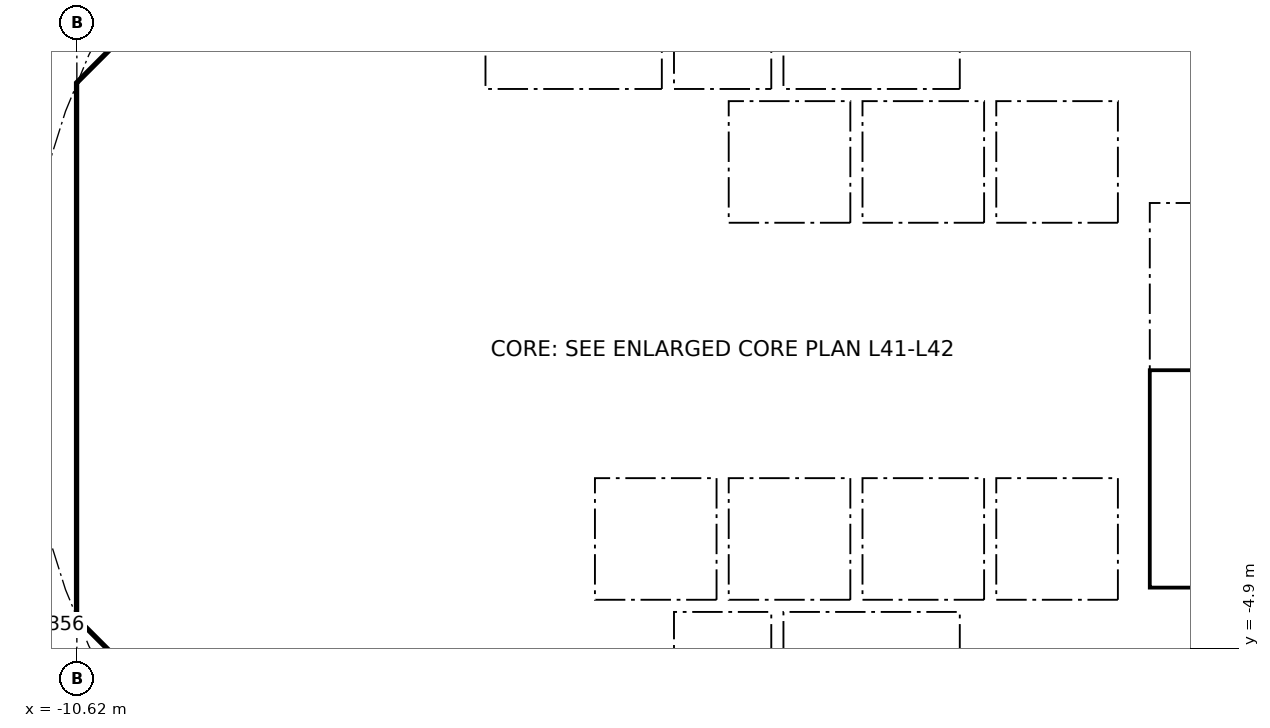
"""IFC4 building model, lengths in metres.
Left out: names, types, materials, properties, quantities, classifications, styles, units other than length and angle.
Written with IfcOpenShell. Run it as: python <this file> out.ifc"""

import sys

from ifc_helpers import new_model, si_unit, direction, frame, frame_2d, origin, place, context, subcontext, project, spatial, polyline, rectangle, outline, extrude, element, fill, save


model = new_model("IFC4")
c1 = context("Model", 3, precision=1e-05, world=origin(), true_north=direction((0.0, 1.0)))
c2 = subcontext(c1, "Body", "Model", "MODEL_VIEW")
j1 = project(units=[si_unit("LENGTHUNIT", "METRE"), si_unit("PLANEANGLEUNIT", "RADIAN")], contexts=[c1])
p1 = place(None, origin())
s1 = spatial("IfcSite", under=j1, at=p1, CompositionType="ELEMENT")
p2 = place(p1, origin())
s2 = spatial("IfcBuilding", under=s1, at=p2, CompositionType="ELEMENT")
p3 = place(p2, frame((0.0, 0.0, 169.6)))
s3 = spatial("IfcBuildingStorey", under=s2, at=p3, CompositionType="ELEMENT", Elevation=169.6)
p4 = place(p3, frame((9.988, 4.613, 0.0), z_axis=(0.0, 0.0, 1.0), x_axis=(-0.707106781187, 0.707106781187, 0.0)))
e1 = element("IfcWall", 1, at=p4, inside=s3, PredefinedType="SHEAR", context=c2, shape_type="SweptSolid", body=[
    extrude(rectangle(XDim=7.602, YDim=0.6, at=frame_2d((3.801, 0.0))), origin(), (0.0, 0.0, 1.0), 3.44),
])
p5 = place(p4, frame((3.201, 0.0, 0.0)))
e2 = element("IfcOpeningElement", 2, at=p5, cuts=e1, PredefinedType="OPENING", context=c2, shape_type="SweptSolid", body=[
    extrude(rectangle(XDim=1.2, YDim=2.1, at=frame_2d((0.6, 1.05))), frame((0.0, 0.31, 0.0), z_axis=(0.0, -1.0, 0.0), x_axis=(1.0, 0.0, 0.0)), (0.0, 0.0, 1.0), 0.62),
])
p6 = place(p3, frame((-4.613, 9.988, 0.0), z_axis=(0.0, 0.0, 1.0), x_axis=(-0.707106781187, -0.707106781187, 0.0)))
e3 = element("IfcWall", 3, at=p6, inside=s3, PredefinedType="SHEAR", context=c2, shape_type="SweptSolid", body=[
    extrude(rectangle(XDim=7.602, YDim=0.6, at=frame_2d((3.801, 0.0))), origin(), (0.0, 0.0, 1.0), 3.44),
])
p7 = place(p6, frame((0.351, 0.0, 0.0)))
e4 = element("IfcOpeningElement", 4, at=p7, cuts=e3, PredefinedType="OPENING", context=c2, shape_type="SweptSolid", body=[
    extrude(rectangle(XDim=1.1, YDim=2.1, at=frame_2d((0.55, 1.05))), frame((0.0, 0.31, 0.0), z_axis=(0.0, -1.0, 0.0), x_axis=(1.0, 0.0, 0.0)), (0.0, 0.0, 1.0), 0.62),
])
p8 = place(p3, frame((-10.325, 3.801, 0.0), z_axis=(0.0, 0.0, 1.0), x_axis=(0.0, -1.0, 0.0)))
e5 = element("IfcWall", 5, at=p8, inside=s3, PredefinedType="SHEAR", context=c2, shape_type="SweptSolid", body=[
    extrude(rectangle(XDim=7.602, YDim=0.6, at=frame_2d((3.801, 0.0))), origin(), (0.0, 0.0, 1.0), 3.44),
])
p9 = place(p8, frame((0.651, 0.0, 0.0)))
e6 = element("IfcOpeningElement", 6, at=p9, cuts=e5, PredefinedType="OPENING", context=c2, shape_type="SweptSolid", body=[
    extrude(rectangle(XDim=1.5, YDim=2.1, at=frame_2d((0.75, 1.05))), frame((0.0, 0.31, 0.0), z_axis=(0.0, -1.0, 0.0), x_axis=(1.0, 0.0, 0.0)), (0.0, 0.0, 1.0), 0.62),
])
p10 = place(p8, frame((5.451, 0.0, 0.0)))
e7 = element("IfcOpeningElement", 7, at=p10, cuts=e5, PredefinedType="OPENING", context=c2, shape_type="SweptSolid", body=[
    extrude(rectangle(XDim=1.5, YDim=2.1, at=frame_2d((0.75, 1.05))), frame((0.0, 0.31, 0.0), z_axis=(0.0, -1.0, 0.0), x_axis=(1.0, 0.0, 0.0)), (0.0, 0.0, 1.0), 0.62),
])
p11 = place(p3, frame((-9.988, -4.613, 0.0), z_axis=(0.0, 0.0, 1.0), x_axis=(0.707106781187, -0.707106781187, 0.0)))
e8 = element("IfcWall", 8, at=p11, inside=s3, PredefinedType="SHEAR", context=c2, shape_type="SweptSolid", body=[
    extrude(rectangle(XDim=7.602, YDim=0.6, at=frame_2d((3.801, 0.0))), origin(), (0.0, 0.0, 1.0), 3.44),
])
p12 = place(p11, frame((6.151, 0.0, 0.0)))
e9 = element("IfcOpeningElement", 9, at=p12, cuts=e8, PredefinedType="OPENING", context=c2, shape_type="SweptSolid", body=[
    extrude(rectangle(XDim=1.1, YDim=2.1, at=frame_2d((0.55, 1.05))), frame((0.0, 0.31, 0.0), z_axis=(0.0, -1.0, 0.0), x_axis=(1.0, 0.0, 0.0)), (0.0, 0.0, 1.0), 0.62),
])
p13 = place(p3, frame((4.613, -9.988, 0.0), z_axis=(0.0, 0.0, 1.0), x_axis=(0.707106781187, 0.707106781187, 0.0)))
e10 = element("IfcWall", 10, at=p13, inside=s3, PredefinedType="SHEAR", context=c2, shape_type="SweptSolid", body=[
    extrude(rectangle(XDim=7.602, YDim=0.6, at=frame_2d((3.801, 0.0))), origin(), (0.0, 0.0, 1.0), 3.44),
])
p14 = place(p13, frame((3.201, 0.0, 0.0)))
e11 = element("IfcOpeningElement", 11, at=p14, cuts=e10, PredefinedType="OPENING", context=c2, shape_type="SweptSolid", body=[
    extrude(rectangle(XDim=1.2, YDim=2.1, at=frame_2d((0.6, 1.05))), frame((0.0, 0.31, 0.0), z_axis=(0.0, -1.0, 0.0), x_axis=(1.0, 0.0, 0.0)), (0.0, 0.0, 1.0), 0.62),
])
p15 = place(p3, frame((-5.8, 4.3, 0.0), z_axis=(0.0, 0.0, 1.0), x_axis=(0.0, 1.0, 0.0)))
e12 = element("IfcWall", 12, at=p15, inside=s3, PredefinedType="PARTITIONING", context=c2, shape_type="SweptSolid", body=[
    extrude(rectangle(XDim=3.927, YDim=0.15, at=frame_2d((1.963, 0.0))), origin(), (0.0, 0.0, 1.0), 3.44),
])
p16 = place(p15, frame((1.551, 0.0, 0.0)))
e13 = element("IfcOpeningElement", 13, at=p16, cuts=e12, PredefinedType="OPENING", context=c2, shape_type="SweptSolid", body=[
    extrude(rectangle(XDim=0.9, YDim=2.1, at=frame_2d((0.45, 1.05))), frame((0.0, 0.085, 0.0), z_axis=(0.0, -1.0, 0.0), x_axis=(1.0, 0.0, 0.0)), (0.0, 0.0, 1.0), 0.17),
])
p17 = place(p3, frame((4.0, 4.3, 0.0), z_axis=(0.0, 0.0, 1.0), x_axis=(0.0, 1.0, 0.0)))
e14 = element("IfcWall", 14, at=p17, inside=s3, PredefinedType="SOLIDWALL", context=c2, shape_type="SweptSolid", body=[
    extrude(rectangle(XDim=2.2, YDim=0.2, at=frame_2d((1.1, 0.0))), origin(), (0.0, 0.0, 1.0), 3.44),
])
p18 = place(p17, frame((0.55, 0.0, 0.0)))
e15 = element("IfcOpeningElement", 15, at=p18, cuts=e14, PredefinedType="OPENING", context=c2, shape_type="SweptSolid", body=[
    extrude(rectangle(XDim=1.1, YDim=2.1, at=frame_2d((0.55, 1.05))), frame((0.0, 0.11, 0.0), z_axis=(0.0, -1.0, 0.0), x_axis=(1.0, 0.0, 0.0)), (0.0, 0.0, 1.0), 0.22),
])
p19 = place(p3, frame((-4.0, 4.3, 0.0), z_axis=(0.0, 0.0, 1.0), x_axis=(0.0, 1.0, 0.0)))
e16 = element("IfcWall", 16, at=p19, inside=s3, PredefinedType="SOLIDWALL", context=c2, shape_type="SweptSolid", body=[
    extrude(rectangle(XDim=2.2, YDim=0.2, at=frame_2d((1.1, 0.0))), origin(), (0.0, 0.0, 1.0), 3.44),
])
p20 = place(p19, frame((0.55, 0.0, 0.0)))
e17 = element("IfcOpeningElement", 17, at=p20, cuts=e16, PredefinedType="OPENING", context=c2, shape_type="SweptSolid", body=[
    extrude(rectangle(XDim=1.1, YDim=2.1, at=frame_2d((0.55, 1.05))), frame((0.0, 0.11, 0.0), z_axis=(0.0, -1.0, 0.0), x_axis=(1.0, 0.0, 0.0)), (0.0, 0.0, 1.0), 0.22),
])
p21 = place(p3, frame((-6.7, 2.0, 0.0), z_axis=(0.0, 0.0, 1.0), x_axis=(1.0, 0.0, 0.0)))
e18 = element("IfcWall", 18, at=p21, inside=s3, PredefinedType="SOLIDWALL", context=c2, shape_type="SweptSolid", body=[
    extrude(rectangle(XDim=13.4, YDim=0.2, at=frame_2d((6.7, 0.0))), origin(), (0.0, 0.0, 1.0), 3.44),
])
p22 = place(p21, frame((7.25, 0.0, 0.0)))
e19 = element("IfcOpeningElement", 19, at=p22, cuts=e18, PredefinedType="OPENING", context=c2, shape_type="SweptSolid", body=[
    extrude(rectangle(XDim=1.1, YDim=2.1, at=frame_2d((0.55, 1.05))), frame((0.0, 0.11, 0.0), z_axis=(0.0, -1.0, 0.0), x_axis=(1.0, 0.0, 0.0)), (0.0, 0.0, 1.0), 0.22),
])
p23 = place(p21, frame((9.45, 0.0, 0.0)))
e20 = element("IfcOpeningElement", 20, at=p23, cuts=e18, PredefinedType="OPENING", context=c2, shape_type="SweptSolid", body=[
    extrude(rectangle(XDim=1.1, YDim=2.1, at=frame_2d((0.55, 1.05))), frame((0.0, 0.11, 0.0), z_axis=(0.0, -1.0, 0.0), x_axis=(1.0, 0.0, 0.0)), (0.0, 0.0, 1.0), 0.22),
])
p24 = place(p21, frame((2.95, 0.0, 0.0)))
e21 = element("IfcOpeningElement", 21, at=p24, cuts=e18, PredefinedType="OPENING", context=c2, shape_type="SweptSolid", body=[
    extrude(rectangle(XDim=0.9, YDim=2.1, at=frame_2d((0.45, 1.05))), frame((0.0, 0.11, 0.0), z_axis=(0.0, -1.0, 0.0), x_axis=(1.0, 0.0, 0.0)), (0.0, 0.0, 1.0), 0.22),
])
p25 = place(p3, frame((6.7, 4.0, 0.0), z_axis=(0.0, 0.0, 1.0), x_axis=(1.0, 0.0, 0.0)))
e22 = element("IfcWall", 22, at=p25, inside=s3, PredefinedType="SOLIDWALL", context=c2, shape_type="SweptSolid", body=[
    extrude(rectangle(XDim=3.325, YDim=0.2, at=frame_2d((1.662, 0.0))), origin(), (0.0, 0.0, 1.0), 3.44),
])
p26 = place(p25, frame((1.25, 0.0, 0.0)))
e23 = element("IfcOpeningElement", 23, at=p26, cuts=e22, PredefinedType="OPENING", context=c2, shape_type="SweptSolid", body=[
    extrude(rectangle(XDim=1.1, YDim=2.1, at=frame_2d((0.55, 1.05))), frame((0.0, 0.11, 0.0), z_axis=(0.0, -1.0, 0.0), x_axis=(1.0, 0.0, 0.0)), (0.0, 0.0, 1.0), 0.22),
])
p27 = place(p3, frame((-5.8, -8.227, 0.0), z_axis=(0.0, 0.0, 1.0), x_axis=(0.0, 1.0, 0.0)))
e24 = element("IfcWall", 24, at=p27, inside=s3, PredefinedType="PARTITIONING", context=c2, shape_type="SweptSolid", body=[
    extrude(rectangle(XDim=3.927, YDim=0.15, at=frame_2d((1.963, 0.0))), origin(), (0.0, 0.0, 1.0), 3.44),
])
p28 = place(p27, frame((2.764, 0.0, 0.0)))
e25 = element("IfcOpeningElement", 25, at=p28, cuts=e24, PredefinedType="OPENING", context=c2, shape_type="SweptSolid", body=[
    extrude(rectangle(XDim=0.9, YDim=2.1, at=frame_2d((0.45, 1.05))), frame((0.0, 0.085, 0.0), z_axis=(0.0, -1.0, 0.0), x_axis=(1.0, 0.0, 0.0)), (0.0, 0.0, 1.0), 0.17),
])
p29 = place(p27, frame((0.688, 0.0, 0.0)))
e26 = element("IfcOpeningElement", 26, at=p29, cuts=e24, PredefinedType="OPENING", context=c2, shape_type="SweptSolid", body=[
    extrude(rectangle(XDim=0.9, YDim=2.1, at=frame_2d((0.45, 1.05))), frame((0.0, 0.085, 0.0), z_axis=(0.0, -1.0, 0.0), x_axis=(1.0, 0.0, 0.0)), (0.0, 0.0, 1.0), 0.17),
])
p30 = place(p3, frame((4.0, -6.5, 0.0), z_axis=(0.0, 0.0, 1.0), x_axis=(0.0, 1.0, 0.0)))
e27 = element("IfcWall", 27, at=p30, inside=s3, PredefinedType="SOLIDWALL", context=c2, shape_type="SweptSolid", body=[
    extrude(rectangle(XDim=2.2, YDim=0.2, at=frame_2d((1.1, 0.0))), origin(), (0.0, 0.0, 1.0), 3.44),
])
p31 = place(p30, frame((0.55, 0.0, 0.0)))
e28 = element("IfcOpeningElement", 28, at=p31, cuts=e27, PredefinedType="OPENING", context=c2, shape_type="SweptSolid", body=[
    extrude(rectangle(XDim=1.1, YDim=2.1, at=frame_2d((0.55, 1.05))), frame((0.0, 0.11, 0.0), z_axis=(0.0, -1.0, 0.0), x_axis=(1.0, 0.0, 0.0)), (0.0, 0.0, 1.0), 0.22),
])
p32 = place(p3, frame((-4.0, -6.5, 0.0), z_axis=(0.0, 0.0, 1.0), x_axis=(0.0, 1.0, 0.0)))
e29 = element("IfcWall", 29, at=p32, inside=s3, PredefinedType="SOLIDWALL", context=c2, shape_type="SweptSolid", body=[
    extrude(rectangle(XDim=2.2, YDim=0.2, at=frame_2d((1.1, 0.0))), origin(), (0.0, 0.0, 1.0), 3.44),
])
p33 = place(p32, frame((0.65, 0.0, 0.0)))
e30 = element("IfcOpeningElement", 30, at=p33, cuts=e29, PredefinedType="OPENING", context=c2, shape_type="SweptSolid", body=[
    extrude(rectangle(XDim=0.9, YDim=2.1, at=frame_2d((0.45, 1.05))), frame((0.0, 0.11, 0.0), z_axis=(0.0, -1.0, 0.0), x_axis=(1.0, 0.0, 0.0)), (0.0, 0.0, 1.0), 0.22),
])
p34 = place(p3, frame((-6.7, -2.0, 0.0), z_axis=(0.0, 0.0, 1.0), x_axis=(1.0, 0.0, 0.0)))
e31 = element("IfcWall", 31, at=p34, inside=s3, PredefinedType="SOLIDWALL", context=c2, shape_type="SweptSolid", body=[
    extrude(rectangle(XDim=13.4, YDim=0.2, at=frame_2d((6.7, 0.0))), origin(), (0.0, 0.0, 1.0), 3.44),
])
p35 = place(p34, frame((5.05, 0.0, 0.0)))
e32 = element("IfcOpeningElement", 32, at=p35, cuts=e31, PredefinedType="OPENING", context=c2, shape_type="SweptSolid", body=[
    extrude(rectangle(XDim=1.1, YDim=2.1, at=frame_2d((0.55, 1.05))), frame((0.0, 0.11, 0.0), z_axis=(0.0, -1.0, 0.0), x_axis=(1.0, 0.0, 0.0)), (0.0, 0.0, 1.0), 0.22),
])
p36 = place(p34, frame((7.25, 0.0, 0.0)))
e33 = element("IfcOpeningElement", 33, at=p36, cuts=e31, PredefinedType="OPENING", context=c2, shape_type="SweptSolid", body=[
    extrude(rectangle(XDim=1.1, YDim=2.1, at=frame_2d((0.55, 1.05))), frame((0.0, 0.11, 0.0), z_axis=(0.0, -1.0, 0.0), x_axis=(1.0, 0.0, 0.0)), (0.0, 0.0, 1.0), 0.22),
])
p37 = place(p34, frame((1.85, 0.0, 0.0)))
e34 = element("IfcOpeningElement", 34, at=p37, cuts=e31, PredefinedType="OPENING", context=c2, shape_type="SweptSolid", body=[
    extrude(rectangle(XDim=0.9, YDim=2.1, at=frame_2d((0.45, 1.05))), frame((0.0, 0.11, 0.0), z_axis=(0.0, -1.0, 0.0), x_axis=(1.0, 0.0, 0.0)), (0.0, 0.0, 1.0), 0.22),
])
p38 = place(p3, origin())
e35 = element("IfcWall", 35, at=p38, inside=s3, PredefinedType="SHEAR", context=c2, shape_type="SweptSolid", body=[
    extrude(outline(polyline([(-10.625, -3.801), (-10.025, -3.801), (-10.025, -4.152), (-9.776, -4.401), (-10.2, -4.825), (-10.625, -4.401), (-10.625, -3.801)])), origin(), (0.0, 0.0, 1.0), 3.44),
])
p39 = place(p3, origin())
e36 = element("IfcWall", 36, at=p39, inside=s3, PredefinedType="SHEAR", context=c2, shape_type="SweptSolid", body=[
    extrude(outline(polyline([(-10.2, 4.825), (-9.776, 4.401), (-10.025, 4.152), (-10.025, 3.801), (-10.625, 3.801), (-10.625, 4.401), (-10.2, 4.825)])), origin(), (0.0, 0.0, 1.0), 3.44),
])
for number, where, z_axis, x_axis in (
    (37, (-0.9, -6.5, 0.0), (0.0, 0.0, 1.0), (0.0, 1.0, 0.0)),
    (38, (0.9, -6.5, 0.0), (0.0, 0.0, 1.0), (0.0, 1.0, 0.0)),
):
    element("IfcWall", number, at=place(p3, frame(where, z_axis=z_axis, x_axis=x_axis)), inside=s3, PredefinedType="SOLIDWALL", context=c2, shape_type="SweptSolid", body=[
        extrude(rectangle(XDim=2.2, YDim=0.2, at=frame_2d((1.1, 0.0))), origin(), (0.0, 0.0, 1.0), 3.44),
    ])
p40 = place(p3, origin())
e39 = element("IfcWall", 39, at=p40, inside=s3, PredefinedType="SOLIDWALL", context=c2, shape_type="SweptSolid", body=[
    extrude(outline(polyline([(-6.7, -2.1), (-6.5, -2.1), (-6.5, -4.1), (-2.3, -4.1), (-2.3, -2.1), (-2.1, -2.1), (-2.1, -4.1), (-0.1, -4.1), (-0.1, -2.1), (0.1, -2.1), (0.1, -4.1), (2.1, -4.1), (2.1, -2.1), (2.3, -2.1), (2.3, -4.1), (4.3, -4.1), (4.3, -2.1), (4.5, -2.1), (4.5, -4.1), (6.5, -4.1), (6.5, -2.1), (6.7, -2.1), (6.7, -4.3), (-6.7, -4.3), (-6.7, -2.1)])), origin(), (0.0, 0.0, 1.0), 3.44),
])
for number, where, z_axis, x_axis in (
    (40, (-0.9, 4.3, 0.0), (0.0, 0.0, 1.0), (0.0, 1.0, 0.0)),
    (41, (0.9, 4.3, 0.0), (0.0, 0.0, 1.0), (0.0, 1.0, 0.0)),
):
    element("IfcWall", number, at=place(p3, frame(where, z_axis=z_axis, x_axis=x_axis)), inside=s3, PredefinedType="SOLIDWALL", context=c2, shape_type="SweptSolid", body=[
        extrude(rectangle(XDim=2.2, YDim=0.2, at=frame_2d((1.1, 0.0))), origin(), (0.0, 0.0, 1.0), 3.44),
    ])
p41 = place(p3, origin())
e42 = element("IfcWall", 42, at=p41, inside=s3, PredefinedType="SOLIDWALL", context=c2, shape_type="SweptSolid", body=[
    extrude(outline(polyline([(-6.7, 4.3), (6.7, 4.3), (6.7, 2.1), (6.5, 2.1), (6.5, 4.1), (4.5, 4.1), (4.5, 2.1), (4.3, 2.1), (4.3, 4.1), (2.3, 4.1), (2.3, 2.1), (2.1, 2.1), (2.1, 4.1), (0.1, 4.1), (0.1, 2.1), (-0.1, 2.1), (-0.1, 4.1), (-6.5, 4.1), (-6.5, 2.1), (-6.7, 2.1), (-6.7, 4.3)])), origin(), (0.0, 0.0, 1.0), 3.44),
])
for number, where, z_axis, x_axis in (
    (43, (-10.025, -4.0, 0.0), (0.0, 0.0, 1.0), (1.0, 0.0, 0.0)),
    (44, (-10.025, 4.0, 0.0), (0.0, 0.0, 1.0), (1.0, 0.0, 0.0)),
):
    element("IfcWall", number, at=place(p3, frame(where, z_axis=z_axis, x_axis=x_axis)), inside=s3, PredefinedType="PARTITIONING", context=c2, shape_type="SweptSolid", body=[
        extrude(rectangle(XDim=3.325, YDim=0.2, at=frame_2d((1.662, 0.0))), origin(), (0.0, 0.0, 1.0), 3.44),
    ])
p42 = place(p3, origin())
e45 = element("IfcWall", 45, at=p42, inside=s3, PredefinedType="SOLIDWALL", context=c2, shape_type="SweptSolid", body=[
    extrude(outline(polyline([(7.025, -3.9), (6.7, -3.9), (6.7, 3.9), (7.025, 3.9), (7.025, -3.9)])), origin(), (0.0, 0.0, 1.0), 3.44),
])
p43 = place(p3, origin())
e46 = element("IfcWall", 46, at=p43, inside=s3, PredefinedType="SOLIDWALL", context=c2, shape_type="SweptSolid", body=[
    extrude(outline(polyline([(10.025, -4.1), (6.7, -4.1), (6.7, -3.9), (10.025, -3.9), (10.025, -4.1)])), origin(), (0.0, 0.0, 1.0), 3.44),
])
p44 = place(p22, origin())
e47 = element("IfcDoor", 47, at=p44, inside=s3, OperationType="DOUBLE_DOOR_SLIDING", PredefinedType="DOOR", context=c2, shape_type="SweptSolid", body=[
    extrude(rectangle(XDim=1.1, YDim=2.1, at=frame_2d((0.55, 1.05))), frame((0.0, 0.025, 0.0), z_axis=(0.0, -1.0, 0.0), x_axis=(1.0, 0.0, 0.0)), (0.0, 0.0, 1.0), 0.05),
])
fill(e19, e47)
p45 = place(p23, origin())
e48 = element("IfcDoor", 48, at=p45, inside=s3, OperationType="DOUBLE_DOOR_SLIDING", PredefinedType="DOOR", context=c2, shape_type="SweptSolid", body=[
    extrude(rectangle(XDim=1.1, YDim=2.1, at=frame_2d((0.55, 1.05))), frame((0.0, 0.025, 0.0), z_axis=(0.0, -1.0, 0.0), x_axis=(1.0, 0.0, 0.0)), (0.0, 0.0, 1.0), 0.05),
])
fill(e20, e48)
p46 = place(p35, origin())
e49 = element("IfcDoor", 49, at=p46, inside=s3, OperationType="DOUBLE_DOOR_SLIDING", PredefinedType="DOOR", context=c2, shape_type="SweptSolid", body=[
    extrude(rectangle(XDim=1.1, YDim=2.1, at=frame_2d((0.55, 1.05))), frame((0.0, 0.025, 0.0), z_axis=(0.0, -1.0, 0.0), x_axis=(1.0, 0.0, 0.0)), (0.0, 0.0, 1.0), 0.05),
])
fill(e32, e49)
p47 = place(p36, origin())
e50 = element("IfcDoor", 50, at=p47, inside=s3, OperationType="DOUBLE_DOOR_SLIDING", PredefinedType="DOOR", context=c2, shape_type="SweptSolid", body=[
    extrude(rectangle(XDim=1.1, YDim=2.1, at=frame_2d((0.55, 1.05))), frame((0.0, 0.025, 0.0), z_axis=(0.0, -1.0, 0.0), x_axis=(1.0, 0.0, 0.0)), (0.0, 0.0, 1.0), 0.05),
])
fill(e33, e50)
p48 = place(p18, origin())
e51 = element("IfcDoor", 51, at=p48, inside=s3, OperationType="DOUBLE_DOOR_SLIDING", PredefinedType="DOOR", context=c2, shape_type="SweptSolid", body=[
    extrude(rectangle(XDim=1.1, YDim=2.1, at=frame_2d((0.55, 1.05))), frame((0.0, 0.025, 0.0), z_axis=(0.0, -1.0, 0.0), x_axis=(1.0, 0.0, 0.0)), (0.0, 0.0, 1.0), 0.05),
])
fill(e15, e51)
p49 = place(p31, origin())
e52 = element("IfcDoor", 52, at=p49, inside=s3, OperationType="DOUBLE_DOOR_SLIDING", PredefinedType="DOOR", context=c2, shape_type="SweptSolid", body=[
    extrude(rectangle(XDim=1.1, YDim=2.1, at=frame_2d((0.55, 1.05))), frame((0.0, 0.025, 0.0), z_axis=(0.0, -1.0, 0.0), x_axis=(1.0, 0.0, 0.0)), (0.0, 0.0, 1.0), 0.05),
])
fill(e28, e52)
p50 = place(p20, origin())
e53 = element("IfcDoor", 53, at=p50, inside=s3, OperationType="DOUBLE_DOOR_SLIDING", PredefinedType="DOOR", context=c2, shape_type="SweptSolid", body=[
    extrude(rectangle(XDim=1.1, YDim=2.1, at=frame_2d((0.55, 1.05))), frame((0.0, 0.025, 0.0), z_axis=(0.0, -1.0, 0.0), x_axis=(1.0, 0.0, 0.0)), (0.0, 0.0, 1.0), 0.05),
])
fill(e17, e53)
p51 = place(p28, origin())
e54 = element("IfcDoor", 54, at=p51, inside=s3, OperationType="SINGLE_SWING_RIGHT", PredefinedType="DOOR", context=c2, shape_type="SweptSolid", body=[
    extrude(rectangle(XDim=0.9, YDim=2.1, at=frame_2d((0.45, 1.05))), frame((0.0, 0.025, 0.0), z_axis=(0.0, -1.0, 0.0), x_axis=(1.0, 0.0, 0.0)), (0.0, 0.0, 1.0), 0.05),
])
fill(e25, e54)
p52 = place(p24, origin())
e55 = element("IfcDoor", 55, at=p52, inside=s3, OperationType="SINGLE_SWING_LEFT", PredefinedType="DOOR", context=c2, shape_type="SweptSolid", body=[
    extrude(rectangle(XDim=0.9, YDim=2.1, at=frame_2d((0.45, 1.05))), frame((0.0, 0.025, 0.0), z_axis=(0.0, -1.0, 0.0), x_axis=(1.0, 0.0, 0.0)), (0.0, 0.0, 1.0), 0.05),
])
fill(e21, e55)
p53 = place(p37, frame((0.9, 0.0, 0.0), x_axis=(-1.0, 0.0, 0.0)))
e56 = element("IfcDoor", 56, at=p53, inside=s3, OperationType="SINGLE_SWING_RIGHT", PredefinedType="DOOR", context=c2, shape_type="SweptSolid", body=[
    extrude(rectangle(XDim=0.9, YDim=2.1, at=frame_2d((0.45, 1.05))), frame((0.0, 0.025, 0.0), z_axis=(0.0, -1.0, 0.0), x_axis=(1.0, 0.0, 0.0)), (0.0, 0.0, 1.0), 0.05),
])
fill(e34, e56)
p54 = place(p9, origin())
e57 = element("IfcDoor", 57, at=p54, inside=s3, OperationType="DOUBLE_DOOR_SINGLE_SWING", PredefinedType="DOOR", context=c2, shape_type="SweptSolid", body=[
    extrude(rectangle(XDim=1.5, YDim=2.1, at=frame_2d((0.75, 1.05))), frame((0.0, 0.025, 0.0), z_axis=(0.0, -1.0, 0.0), x_axis=(1.0, 0.0, 0.0)), (0.0, 0.0, 1.0), 0.05),
])
fill(e6, e57)
p55 = place(p10, origin())
e58 = element("IfcDoor", 58, at=p55, inside=s3, OperationType="DOUBLE_DOOR_SINGLE_SWING", PredefinedType="DOOR", context=c2, shape_type="SweptSolid", body=[
    extrude(rectangle(XDim=1.5, YDim=2.1, at=frame_2d((0.75, 1.05))), frame((0.0, 0.025, 0.0), z_axis=(0.0, -1.0, 0.0), x_axis=(1.0, 0.0, 0.0)), (0.0, 0.0, 1.0), 0.05),
])
fill(e7, e58)
save(model, sys.argv[1])
